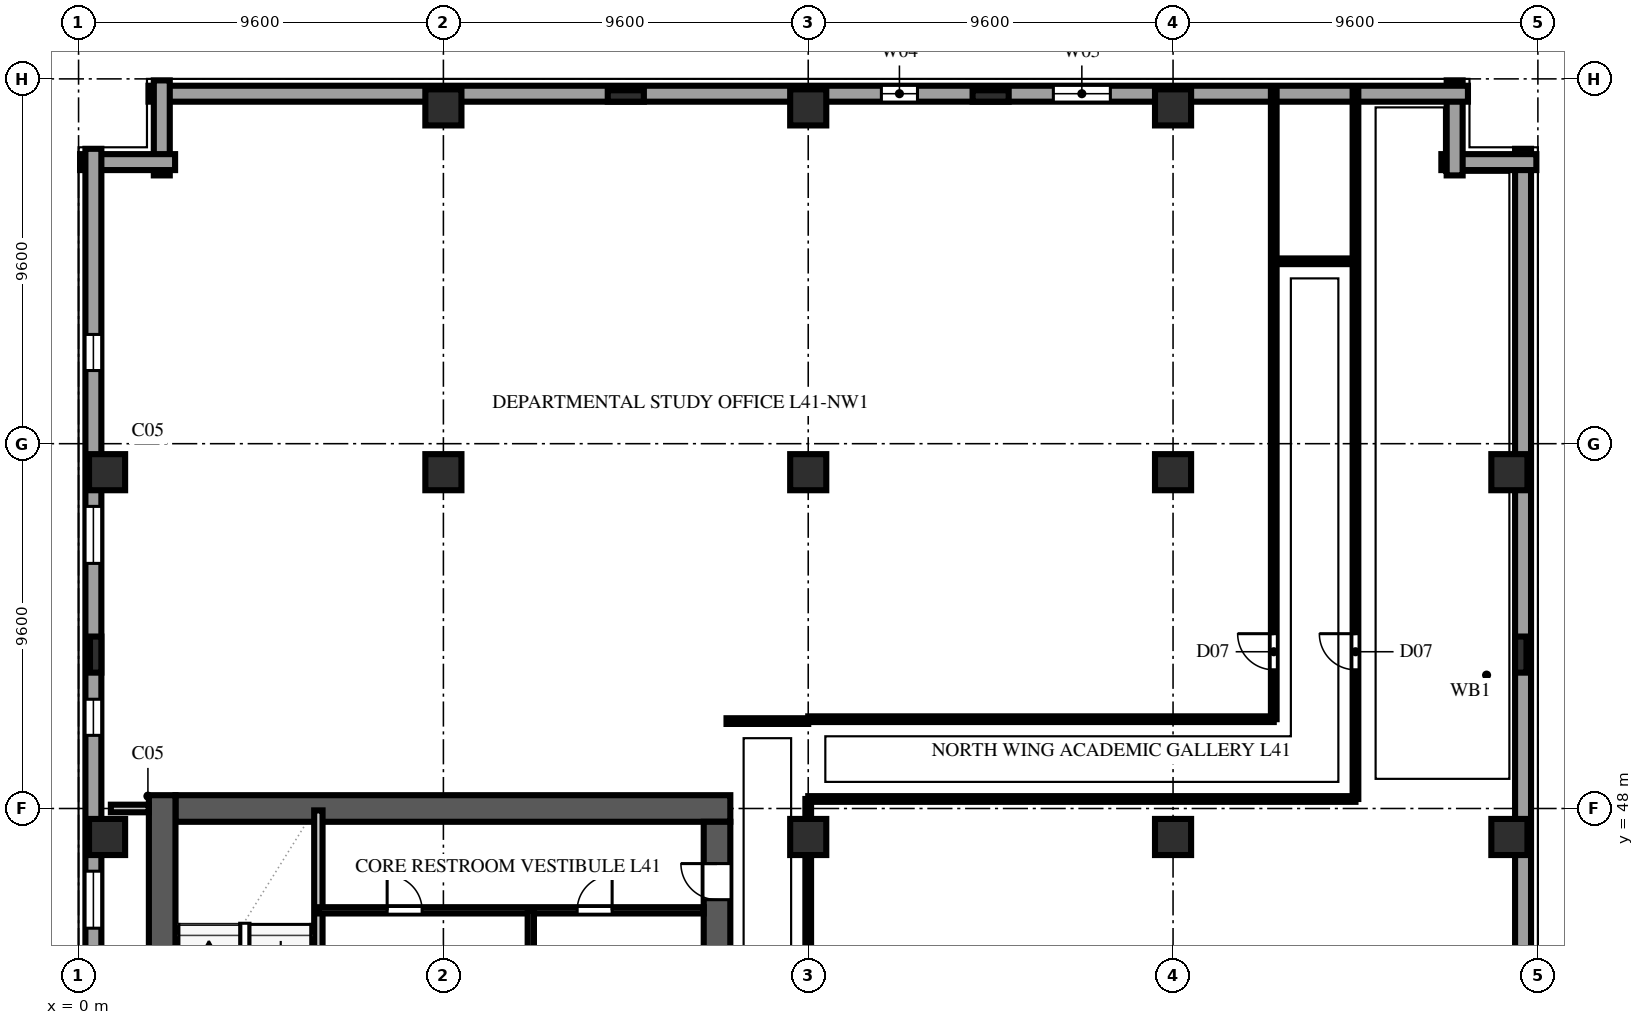
"""IFC4 building model, lengths in metres.
Left out: names, types, materials, properties, quantities, classifications, styles, units other than length and angle.
Written with IfcOpenShell. Run it as: python <this file> out.ifc"""

import sys

from ifc_helpers import new_model, si_unit, direction, frame, frame_2d, origin, origin_2d, place, context, subcontext, project, spatial, rectangle, extrude, element, fill, save


model = new_model("IFC4")
c1 = context("Model", 3, precision=1e-05, world=origin(), true_north=direction((0.0, 1.0)))
c2 = subcontext(c1, "Body", "Model", "MODEL_VIEW")
j1 = project(units=[si_unit("LENGTHUNIT", "METRE"), si_unit("PLANEANGLEUNIT", "RADIAN")], contexts=[c1])
p1 = place(None, origin())
s1 = spatial("IfcSite", under=j1, at=p1, CompositionType="ELEMENT")
p2 = place(p1, origin())
s2 = spatial("IfcBuilding", under=s1, at=p2, CompositionType="ELEMENT")
p3 = place(p2, frame((0.0, 0.0, 163.6)))
s3 = spatial("IfcBuildingStorey", under=s2, at=p3, CompositionType="ELEMENT", Elevation=163.6)
p4 = place(p3, frame((2.55, 48.0, 0.0), z_axis=(0.0, 0.0, 1.0), x_axis=(1.0, 0.0, 0.0)))
e1 = element("IfcWall", 1, at=p4, inside=s3, PredefinedType="SHEAR", context=c2, shape_type="SweptSolid", body=[
    extrude(rectangle(XDim=14.6, YDim=0.7, at=frame_2d((7.3, 0.0))), origin(), (0.0, 0.0, 1.0), 3.54),
])
p5 = place(p3, frame((2.2, 9.25, 0.0), z_axis=(0.0, 0.0, 1.0), x_axis=(0.0, 1.0, 0.0)))
e2 = element("IfcWall", 2, at=p5, inside=s3, PredefinedType="SHEAR", context=c2, shape_type="SweptSolid", body=[
    extrude(rectangle(XDim=39.1, YDim=0.7, at=frame_2d((19.55, 0.0))), origin(), (0.0, 0.0, 1.0), 3.54),
])
p6 = place(p3, frame((16.8, 36.4, 0.0), z_axis=(0.0, 0.0, 1.0), x_axis=(0.0, 1.0, 0.0)))
e3 = element("IfcWall", 3, at=p6, inside=s3, PredefinedType="SHEAR", context=c2, shape_type="SweptSolid", body=[
    extrude(rectangle(XDim=11.25, YDim=0.7, at=frame_2d((5.625, 0.0))), origin(), (0.0, 0.0, 1.0), 3.54),
])
p7 = place(p6, frame((9.2, 0.0, 0.0)))
e4 = element("IfcOpeningElement", 4, at=p7, cuts=e3, PredefinedType="OPENING", context=c2, shape_type="SweptSolid", body=[
    extrude(rectangle(XDim=0.95, YDim=2.15, at=frame_2d((0.475, 1.075))), frame((0.0, 0.362, 0.0), z_axis=(0.0, -1.0, 0.0), x_axis=(1.0, 0.0, 0.0)), (0.0, 0.0, 1.0), 0.724),
])
for number, where, z_axis, x_axis in (
    (5, (0.75, 47.25, 0.0), (0.0, 0.0, 1.0), (1.0, 0.0, 0.0)),
    (6, (0.75, 56.85, 0.0), (0.0, 0.0, 1.0), (1.0, 0.0, 0.0)),
    (7, (9.6, 56.85, 0.0), (0.0, 0.0, 1.0), (1.0, 0.0, 0.0)),
    (8, (9.6, 66.45, 0.0), (0.0, 0.0, 1.0), (1.0, 0.0, 0.0)),
    (9, (19.2, 47.25, 0.0), (0.0, 0.0, 1.0), (1.0, 0.0, 0.0)),
    (10, (19.2, 56.85, 0.0), (0.0, 0.0, 1.0), (1.0, 0.0, 0.0)),
    (11, (19.2, 66.45, 0.0), (0.0, 0.0, 1.0), (1.0, 0.0, 0.0)),
    (12, (28.8, 47.25, 0.0), (0.0, 0.0, 1.0), (1.0, 0.0, 0.0)),
    (13, (28.8, 56.85, 0.0), (0.0, 0.0, 1.0), (1.0, 0.0, 0.0)),
    (14, (28.8, 66.45, 0.0), (0.0, 0.0, 1.0), (1.0, 0.0, 0.0)),
    (15, (37.65, 47.25, 0.0), (0.0, 0.0, 1.0), (1.0, 0.0, 0.0)),
    (16, (37.65, 56.85, 0.0), (0.0, 0.0, 1.0), (1.0, 0.0, 0.0)),
):
    element("IfcColumn", number, at=place(p3, frame(where, z_axis=z_axis, x_axis=x_axis)), inside=s3, PredefinedType="COLUMN", context=c2, shape_type="SweptSolid", body=[
        extrude(rectangle(XDim=0.95, YDim=0.95, at=origin_2d()), origin(), (0.0, 0.0, 1.0), 3.8),
    ])
for number, where, z_axis, x_axis in (
    (17, (0.45, 52.05, 0.0), (0.0, 0.0, 1.0), (0.0, 1.0, 0.0)),
    (18, (14.4, 66.75, 0.0), (0.0, 0.0, 1.0), (1.0, 0.0, 0.0)),
    (19, (24.0, 66.75, 0.0), (0.0, 0.0, 1.0), (1.0, 0.0, 0.0)),
    (20, (37.95, 52.05, 0.0), (0.0, 0.0, 1.0), (0.0, 1.0, 0.0)),
):
    element("IfcColumn", number, at=place(p3, frame(where, z_axis=z_axis, x_axis=x_axis)), inside=s3, PredefinedType="PILASTER", context=c2, shape_type="SweptSolid", body=[
        extrude(rectangle(XDim=0.95, YDim=0.3, at=origin_2d()), origin(), (0.0, 0.0, 1.0), 3.8),
    ])
p8 = place(p3, frame((38.01, 37.66, 0.0), z_axis=(0.0, 0.0, 1.0), x_axis=(0.0, 1.0, 0.0)))
e21 = element("IfcWall", 21, at=p8, inside=s3, PredefinedType="SOLIDWALL", context=c2, shape_type="SweptSolid", body=[
    extrude(rectangle(XDim=27.7, YDim=0.42, at=frame_2d((13.85, 0.0))), origin(), (0.0, 0.0, 1.0), 3.54),
])
for number, where, z_axis, x_axis in (
    (22, (38.36, 65.01, 0.0), (0.0, 0.0, 1.0), (-1.0, 0.0, 0.0)),
    (23, (36.21, 64.66, 0.0), (0.0, 0.0, 1.0), (0.0, 1.0, 0.0)),
):
    element("IfcWall", number, at=place(p3, frame(where, z_axis=z_axis, x_axis=x_axis)), inside=s3, PredefinedType="SOLIDWALL", context=c2, shape_type="SweptSolid", body=[
        extrude(rectangle(XDim=2.5, YDim=0.42, at=frame_2d((1.25, 0.0))), origin(), (0.0, 0.0, 1.0), 3.54),
    ])
p9 = place(p3, frame((36.56, 66.81, 0.0), z_axis=(0.0, 0.0, 1.0), x_axis=(-1.0, 0.0, 0.0)))
e24 = element("IfcWall", 24, at=p9, inside=s3, PredefinedType="SOLIDWALL", context=c2, shape_type="SweptSolid", body=[
    extrude(rectangle(XDim=34.72, YDim=0.42, at=frame_2d((17.36, 0.0))), origin(), (0.0, 0.0, 1.0), 3.54),
])
p10 = place(p9, frame((9.41, 0.0, 0.9)))
e25 = element("IfcOpeningElement", 25, at=p10, cuts=e24, PredefinedType="OPENING", context=c2, shape_type="SweptSolid", body=[
    extrude(rectangle(XDim=1.5, YDim=1.85, at=frame_2d((0.75, 0.925))), frame((0.0, 0.222, 0.0), z_axis=(0.0, -1.0, 0.0), x_axis=(1.0, 0.0, 0.0)), (0.0, 0.0, 1.0), 0.444),
])
p11 = place(p9, frame((14.485, 0.0, 0.9)))
e26 = element("IfcOpeningElement", 26, at=p11, cuts=e24, PredefinedType="OPENING", context=c2, shape_type="SweptSolid", body=[
    extrude(rectangle(XDim=0.95, YDim=1.85, at=frame_2d((0.475, 0.925))), frame((0.0, 0.222, 0.0), z_axis=(0.0, -1.0, 0.0), x_axis=(1.0, 0.0, 0.0)), (0.0, 0.0, 1.0), 0.444),
])
for number, where, z_axis, x_axis in (
    (27, (2.19, 67.16, 0.0), (0.0, 0.0, 1.0), (0.0, -1.0, 0.0)),
    (28, (2.54, 65.01, 0.0), (0.0, 0.0, 1.0), (-1.0, 0.0, 0.0)),
):
    element("IfcWall", number, at=place(p3, frame(where, z_axis=z_axis, x_axis=x_axis)), inside=s3, PredefinedType="SOLIDWALL", context=c2, shape_type="SweptSolid", body=[
        extrude(rectangle(XDim=2.5, YDim=0.42, at=frame_2d((1.25, 0.0))), origin(), (0.0, 0.0, 1.0), 3.54),
    ])
p12 = place(p3, frame((0.39, 65.36, 0.0), z_axis=(0.0, 0.0, 1.0), x_axis=(0.0, -1.0, 0.0)))
e29 = element("IfcWall", 29, at=p12, inside=s3, PredefinedType="SOLIDWALL", context=c2, shape_type="SweptSolid", body=[
    extrude(rectangle(XDim=63.52, YDim=0.42, at=frame_2d((31.76, 0.0))), origin(), (0.0, 0.0, 1.0), 3.54),
])
p13 = place(p12, frame((4.885, 0.0, 0.9)))
e30 = element("IfcOpeningElement", 30, at=p13, cuts=e29, PredefinedType="OPENING", context=c2, shape_type="SweptSolid", body=[
    extrude(rectangle(XDim=0.95, YDim=1.85, at=frame_2d((0.475, 0.925))), frame((0.0, 0.222, 0.0), z_axis=(0.0, -1.0, 0.0), x_axis=(1.0, 0.0, 0.0)), (0.0, 0.0, 1.0), 0.444),
])
p14 = place(p12, frame((9.41, 0.0, 0.9)))
e31 = element("IfcOpeningElement", 31, at=p14, cuts=e29, PredefinedType="OPENING", context=c2, shape_type="SweptSolid", body=[
    extrude(rectangle(XDim=1.5, YDim=1.85, at=frame_2d((0.75, 0.925))), frame((0.0, 0.222, 0.0), z_axis=(0.0, -1.0, 0.0), x_axis=(1.0, 0.0, 0.0)), (0.0, 0.0, 1.0), 0.444),
])
p15 = place(p12, frame((14.485, 0.0, 0.9)))
e32 = element("IfcOpeningElement", 32, at=p15, cuts=e29, PredefinedType="OPENING", context=c2, shape_type="SweptSolid", body=[
    extrude(rectangle(XDim=0.95, YDim=1.85, at=frame_2d((0.475, 0.925))), frame((0.0, 0.222, 0.0), z_axis=(0.0, -1.0, 0.0), x_axis=(1.0, 0.0, 0.0)), (0.0, 0.0, 1.0), 0.444),
])
p16 = place(p12, frame((19.01, 0.0, 0.9)))
e33 = element("IfcOpeningElement", 33, at=p16, cuts=e29, PredefinedType="OPENING", context=c2, shape_type="SweptSolid", body=[
    extrude(rectangle(XDim=1.5, YDim=1.85, at=frame_2d((0.75, 0.925))), frame((0.0, 0.222, 0.0), z_axis=(0.0, -1.0, 0.0), x_axis=(1.0, 0.0, 0.0)), (0.0, 0.0, 1.0), 0.444),
])
p17 = place(p12, frame((24.085, 0.0, 0.9)))
e34 = element("IfcOpeningElement", 34, at=p17, cuts=e29, PredefinedType="OPENING", context=c2, shape_type="SweptSolid", body=[
    extrude(rectangle(XDim=0.95, YDim=1.85, at=frame_2d((0.475, 0.925))), frame((0.0, 0.222, 0.0), z_axis=(0.0, -1.0, 0.0), x_axis=(1.0, 0.0, 0.0)), (0.0, 0.0, 1.0), 0.444),
])
p18 = place(p12, frame((28.61, 0.0, 0.9)))
e35 = element("IfcOpeningElement", 35, at=p18, cuts=e29, PredefinedType="OPENING", context=c2, shape_type="SweptSolid", body=[
    extrude(rectangle(XDim=1.5, YDim=1.85, at=frame_2d((0.75, 0.925))), frame((0.0, 0.222, 0.0), z_axis=(0.0, -1.0, 0.0), x_axis=(1.0, 0.0, 0.0)), (0.0, 0.0, 1.0), 0.444),
])
p19 = place(p12, frame((33.685, 0.0, 0.9)))
e36 = element("IfcOpeningElement", 36, at=p19, cuts=e29, PredefinedType="OPENING", context=c2, shape_type="SweptSolid", body=[
    extrude(rectangle(XDim=0.95, YDim=1.85, at=frame_2d((0.475, 0.925))), frame((0.0, 0.222, 0.0), z_axis=(0.0, -1.0, 0.0), x_axis=(1.0, 0.0, 0.0)), (0.0, 0.0, 1.0), 0.444),
])
p20 = place(p12, frame((38.21, 0.0, 0.9)))
e37 = element("IfcOpeningElement", 37, at=p20, cuts=e29, PredefinedType="OPENING", context=c2, shape_type="SweptSolid", body=[
    extrude(rectangle(XDim=1.5, YDim=1.85, at=frame_2d((0.75, 0.925))), frame((0.0, 0.222, 0.0), z_axis=(0.0, -1.0, 0.0), x_axis=(1.0, 0.0, 0.0)), (0.0, 0.0, 1.0), 0.444),
])
p21 = place(p12, frame((43.285, 0.0, 0.9)))
e38 = element("IfcOpeningElement", 38, at=p21, cuts=e29, PredefinedType="OPENING", context=c2, shape_type="SweptSolid", body=[
    extrude(rectangle(XDim=0.95, YDim=1.85, at=frame_2d((0.475, 0.925))), frame((0.0, 0.222, 0.0), z_axis=(0.0, -1.0, 0.0), x_axis=(1.0, 0.0, 0.0)), (0.0, 0.0, 1.0), 0.444),
])
p22 = place(p12, frame((47.81, 0.0, 0.9)))
e39 = element("IfcOpeningElement", 39, at=p22, cuts=e29, PredefinedType="OPENING", context=c2, shape_type="SweptSolid", body=[
    extrude(rectangle(XDim=1.5, YDim=1.85, at=frame_2d((0.75, 0.925))), frame((0.0, 0.222, 0.0), z_axis=(0.0, -1.0, 0.0), x_axis=(1.0, 0.0, 0.0)), (0.0, 0.0, 1.0), 0.444),
])
p23 = place(p12, frame((52.885, 0.0, 0.9)))
e40 = element("IfcOpeningElement", 40, at=p23, cuts=e29, PredefinedType="OPENING", context=c2, shape_type="SweptSolid", body=[
    extrude(rectangle(XDim=0.95, YDim=1.85, at=frame_2d((0.475, 0.925))), frame((0.0, 0.222, 0.0), z_axis=(0.0, -1.0, 0.0), x_axis=(1.0, 0.0, 0.0)), (0.0, 0.0, 1.0), 0.444),
])
p24 = place(p12, frame((57.41, 0.0, 0.9)))
e41 = element("IfcOpeningElement", 41, at=p24, cuts=e29, PredefinedType="OPENING", context=c2, shape_type="SweptSolid", body=[
    extrude(rectangle(XDim=1.5, YDim=1.85, at=frame_2d((0.75, 0.925))), frame((0.0, 0.222, 0.0), z_axis=(0.0, -1.0, 0.0), x_axis=(1.0, 0.0, 0.0)), (0.0, 0.0, 1.0), 0.444),
])
p25 = place(p3, frame((6.31, 40.14, 0.0), z_axis=(0.0, 0.0, 1.0), x_axis=(0.0, 1.0, 0.0)))
e42 = element("IfcWall", 42, at=p25, inside=s3, PredefinedType="SOLIDWALL", context=c2, shape_type="SweptSolid", body=[
    extrude(rectangle(XDim=7.81, YDim=0.22, at=frame_2d((3.905, 0.0))), origin(), (0.0, 0.0, 1.0), 3.54),
])
p26 = place(p3, frame((6.32, 45.32, 0.0), z_axis=(0.0, 0.0, 1.0), x_axis=(1.0, 0.0, 0.0)))
e43 = element("IfcWall", 43, at=p26, inside=s3, PredefinedType="PLUMBINGWALL", context=c2, shape_type="SweptSolid", body=[
    extrude(rectangle(XDim=10.13, YDim=0.165, at=frame_2d((5.065, 0.0))), origin(), (0.0, 0.0, 1.0), 3.54),
])
p27 = place(p26, frame((1.8, 0.0, 0.0)))
e44 = element("IfcOpeningElement", 44, at=p27, cuts=e43, PredefinedType="OPENING", context=c2, shape_type="SweptSolid", body=[
    extrude(rectangle(XDim=0.92, YDim=2.15, at=frame_2d((0.46, 1.075))), frame((0.0, 0.094, 0.0), z_axis=(0.0, -1.0, 0.0), x_axis=(1.0, 0.0, 0.0)), (0.0, 0.0, 1.0), 0.189),
])
p28 = place(p26, frame((6.8, 0.0, 0.0)))
e45 = element("IfcOpeningElement", 45, at=p28, cuts=e43, PredefinedType="OPENING", context=c2, shape_type="SweptSolid", body=[
    extrude(rectangle(XDim=0.92, YDim=2.15, at=frame_2d((0.46, 1.075))), frame((0.0, 0.094, 0.0), z_axis=(0.0, -1.0, 0.0), x_axis=(1.0, 0.0, 0.0)), (0.0, 0.0, 1.0), 0.189),
])
p29 = place(p3, frame((11.9, 40.4, 0.0), z_axis=(0.0, 0.0, 1.0), x_axis=(0.0, 1.0, 0.0)))
e46 = element("IfcWall", 46, at=p29, inside=s3, PredefinedType="PLUMBINGWALL", context=c2, shape_type="SweptSolid", body=[
    extrude(rectangle(XDim=4.92, YDim=0.165, at=frame_2d((2.46, 0.0))), origin(), (0.0, 0.0, 1.0), 3.54),
])
p30 = place(p3, frame((0.85, 48.0, 0.0), z_axis=(0.0, 0.0, 1.0), x_axis=(1.0, 0.0, 0.0)))
e47 = element("IfcWall", 47, at=p30, inside=s3, PredefinedType="SOLIDWALL", context=c2, shape_type="SweptSolid", body=[
    extrude(rectangle(XDim=0.995, YDim=0.2, at=frame_2d((0.498, 0.0))), origin(), (0.0, 0.0, 1.0), 3.54),
])
p31 = place(p3, frame((17.05, 50.3, 0.0), z_axis=(0.0, 0.0, 1.0), x_axis=(1.0, 0.0, 0.0)))
e48 = element("IfcWall", 48, at=p31, inside=s3, PredefinedType="PARTITIONING", context=c2, shape_type="SweptSolid", body=[
    extrude(rectangle(XDim=2.15, YDim=0.15, at=frame_2d((1.075, 0.0))), origin(), (0.0, 0.0, 1.0), 3.54),
])
p32 = place(p3, frame((19.2, 38.18, 0.0), z_axis=(0.0, 0.0, 1.0), x_axis=(0.0, 1.0, 0.0)))
e49 = element("IfcWall", 49, at=p32, inside=s3, PredefinedType="PARTITIONING", context=c2, shape_type="SweptSolid", body=[
    extrude(rectangle(XDim=10.07, YDim=0.15, at=frame_2d((5.035, 0.0))), origin(), (0.0, 0.0, 1.0), 3.123),
])
p33 = place(p32, frame((3.85, 0.0, 0.0)))
e50 = element("IfcOpeningElement", 50, at=p33, cuts=e49, PredefinedType="OPENING", context=c2, shape_type="SweptSolid", body=[
    extrude(rectangle(XDim=0.95, YDim=2.15, at=frame_2d((0.475, 1.075))), frame((0.0, 0.087, 0.0), z_axis=(0.0, -1.0, 0.0), x_axis=(1.0, 0.0, 0.0)), (0.0, 0.0, 1.0), 0.174),
])
p34 = place(p3, frame((19.2, 48.25, 0.0), z_axis=(0.0, 0.0, 1.0), x_axis=(1.0, 0.0, 0.0)))
e51 = element("IfcWall", 51, at=p34, inside=s3, PredefinedType="PARTITIONING", context=c2, shape_type="SweptSolid", body=[
    extrude(rectangle(XDim=14.4, YDim=0.15, at=frame_2d((7.2, 0.0))), origin(), (0.0, 0.0, 1.0), 3.54),
])
p35 = place(p3, frame((19.2, 50.35, 0.0), z_axis=(0.0, 0.0, 1.0), x_axis=(1.0, 0.0, 0.0)))
e52 = element("IfcWall", 52, at=p35, inside=s3, PredefinedType="PARTITIONING", context=c2, shape_type="SweptSolid", body=[
    extrude(rectangle(XDim=12.25, YDim=0.15, at=frame_2d((6.125, 0.0))), origin(), (0.0, 0.0, 1.0), 3.54),
])
p36 = place(p3, frame((31.45, 62.4, 0.0), z_axis=(0.0, 0.0, 1.0), x_axis=(1.0, 0.0, 0.0)))
e53 = element("IfcWall", 53, at=p36, inside=s3, PredefinedType="PARTITIONING", context=c2, shape_type="SweptSolid", body=[
    extrude(rectangle(XDim=2.15, YDim=0.15, at=frame_2d((1.075, 0.0))), origin(), (0.0, 0.0, 1.0), 3.54),
])
p37 = place(p3, frame((33.6, 48.25, 0.0), z_axis=(0.0, 0.0, 1.0), x_axis=(0.0, 1.0, 0.0)))
e54 = element("IfcWall", 54, at=p37, inside=s3, PredefinedType="PARTITIONING", context=c2, shape_type="SweptSolid", body=[
    extrude(rectangle(XDim=18.73, YDim=0.15, at=frame_2d((9.365, 0.0))), origin(), (0.0, 0.0, 1.0), 3.54),
])
p38 = place(p37, frame((3.4, 0.0, 0.0)))
e55 = element("IfcOpeningElement", 55, at=p38, cuts=e54, PredefinedType="OPENING", context=c2, shape_type="SweptSolid", body=[
    extrude(rectangle(XDim=0.95, YDim=2.15, at=frame_2d((0.475, 1.075))), frame((0.0, 0.087, 0.0), z_axis=(0.0, -1.0, 0.0), x_axis=(1.0, 0.0, 0.0)), (0.0, 0.0, 1.0), 0.174),
])
p39 = place(p3, frame((31.45, 50.35, 0.0), z_axis=(0.0, 0.0, 1.0), x_axis=(0.0, 1.0, 0.0)))
e56 = element("IfcWall", 56, at=p39, inside=s3, PredefinedType="PARTITIONING", context=c2, shape_type="SweptSolid", body=[
    extrude(rectangle(XDim=16.63, YDim=0.15, at=frame_2d((8.315, 0.0))), origin(), (0.0, 0.0, 1.0), 3.54),
])
p40 = place(p39, frame((1.3, 0.0, 0.0)))
e57 = element("IfcOpeningElement", 57, at=p40, cuts=e56, PredefinedType="OPENING", context=c2, shape_type="SweptSolid", body=[
    extrude(rectangle(XDim=0.95, YDim=2.15, at=frame_2d((0.475, 1.075))), frame((0.0, 0.087, 0.0), z_axis=(0.0, -1.0, 0.0), x_axis=(1.0, 0.0, 0.0)), (0.0, 0.0, 1.0), 0.174),
])
p41 = place(p10, origin())
e58 = element("IfcWindow", 58, at=p41, inside=s3, PartitioningType="DOUBLE_PANEL_VERTICAL", PredefinedType="WINDOW", context=c2, shape_type="SweptSolid", body=[
    extrude(rectangle(XDim=1.5, YDim=1.85, at=frame_2d((0.75, 0.925))), frame((0.0, 0.11, 0.0), z_axis=(0.0, -1.0, 0.0), x_axis=(1.0, 0.0, 0.0)), (0.0, 0.0, 1.0), 0.06),
])
fill(e25, e58)
p42 = place(p11, origin())
e59 = element("IfcWindow", 59, at=p42, inside=s3, PartitioningType="SINGLE_PANEL", PredefinedType="WINDOW", context=c2, shape_type="SweptSolid", body=[
    extrude(rectangle(XDim=0.95, YDim=1.85, at=frame_2d((0.475, 0.925))), frame((0.0, 0.11, 0.0), z_axis=(0.0, -1.0, 0.0), x_axis=(1.0, 0.0, 0.0)), (0.0, 0.0, 1.0), 0.06),
])
fill(e26, e59)
p43 = place(p13, origin())
e60 = element("IfcWindow", 60, at=p43, inside=s3, PartitioningType="SINGLE_PANEL", PredefinedType="WINDOW", context=c2, shape_type="SweptSolid", body=[
    extrude(rectangle(XDim=0.95, YDim=1.85, at=frame_2d((0.475, 0.925))), frame((0.0, 0.11, 0.0), z_axis=(0.0, -1.0, 0.0), x_axis=(1.0, 0.0, 0.0)), (0.0, 0.0, 1.0), 0.06),
])
fill(e30, e60)
p44 = place(p14, origin())
e61 = element("IfcWindow", 61, at=p44, inside=s3, PartitioningType="DOUBLE_PANEL_VERTICAL", PredefinedType="WINDOW", context=c2, shape_type="SweptSolid", body=[
    extrude(rectangle(XDim=1.5, YDim=1.85, at=frame_2d((0.75, 0.925))), frame((0.0, 0.11, 0.0), z_axis=(0.0, -1.0, 0.0), x_axis=(1.0, 0.0, 0.0)), (0.0, 0.0, 1.0), 0.06),
])
fill(e31, e61)
p45 = place(p15, origin())
e62 = element("IfcWindow", 62, at=p45, inside=s3, PartitioningType="SINGLE_PANEL", PredefinedType="WINDOW", context=c2, shape_type="SweptSolid", body=[
    extrude(rectangle(XDim=0.95, YDim=1.85, at=frame_2d((0.475, 0.925))), frame((0.0, 0.11, 0.0), z_axis=(0.0, -1.0, 0.0), x_axis=(1.0, 0.0, 0.0)), (0.0, 0.0, 1.0), 0.06),
])
fill(e32, e62)
p46 = place(p16, origin())
e63 = element("IfcWindow", 63, at=p46, inside=s3, PartitioningType="DOUBLE_PANEL_VERTICAL", PredefinedType="WINDOW", context=c2, shape_type="SweptSolid", body=[
    extrude(rectangle(XDim=1.5, YDim=1.85, at=frame_2d((0.75, 0.925))), frame((0.0, 0.11, 0.0), z_axis=(0.0, -1.0, 0.0), x_axis=(1.0, 0.0, 0.0)), (0.0, 0.0, 1.0), 0.06),
])
fill(e33, e63)
p47 = place(p7, origin())
e64 = element("IfcDoor", 64, at=p47, inside=s3, OperationType="SINGLE_SWING_RIGHT", PredefinedType="DOOR", context=c2, shape_type="SweptSolid", body=[
    extrude(rectangle(XDim=0.95, YDim=2.15, at=frame_2d((0.475, 1.075))), frame((0.0, 0.025, 0.0), z_axis=(0.0, -1.0, 0.0), x_axis=(1.0, 0.0, 0.0)), (0.0, 0.0, 1.0), 0.05),
])
fill(e4, e64)
p48 = place(p27, origin())
e65 = element("IfcDoor", 65, at=p48, inside=s3, OperationType="SINGLE_SWING_LEFT", PredefinedType="DOOR", context=c2, shape_type="SweptSolid", body=[
    extrude(rectangle(XDim=0.92, YDim=2.15, at=frame_2d((0.46, 1.075))), frame((0.0, 0.025, 0.0), z_axis=(0.0, -1.0, 0.0), x_axis=(1.0, 0.0, 0.0)), (0.0, 0.0, 1.0), 0.05),
])
fill(e44, e65)
p49 = place(p28, origin())
e66 = element("IfcDoor", 66, at=p49, inside=s3, OperationType="SINGLE_SWING_RIGHT", PredefinedType="DOOR", context=c2, shape_type="SweptSolid", body=[
    extrude(rectangle(XDim=0.92, YDim=2.15, at=frame_2d((0.46, 1.075))), frame((0.0, 0.025, 0.0), z_axis=(0.0, -1.0, 0.0), x_axis=(1.0, 0.0, 0.0)), (0.0, 0.0, 1.0), 0.05),
])
fill(e45, e66)
p50 = place(p38, origin())
e67 = element("IfcDoor", 67, at=p50, inside=s3, OperationType="SINGLE_SWING_RIGHT", PredefinedType="DOOR", context=c2, shape_type="SweptSolid", body=[
    extrude(rectangle(XDim=0.95, YDim=2.15, at=frame_2d((0.475, 1.075))), frame((0.0, 0.025, 0.0), z_axis=(0.0, -1.0, 0.0), x_axis=(1.0, 0.0, 0.0)), (0.0, 0.0, 1.0), 0.05),
])
fill(e55, e67)
p51 = place(p40, origin())
e68 = element("IfcDoor", 68, at=p51, inside=s3, OperationType="SINGLE_SWING_RIGHT", PredefinedType="DOOR", context=c2, shape_type="SweptSolid", body=[
    extrude(rectangle(XDim=0.95, YDim=2.15, at=frame_2d((0.475, 1.075))), frame((0.0, 0.025, 0.0), z_axis=(0.0, -1.0, 0.0), x_axis=(1.0, 0.0, 0.0)), (0.0, 0.0, 1.0), 0.05),
])
fill(e57, e68)
save(model, sys.argv[1])
